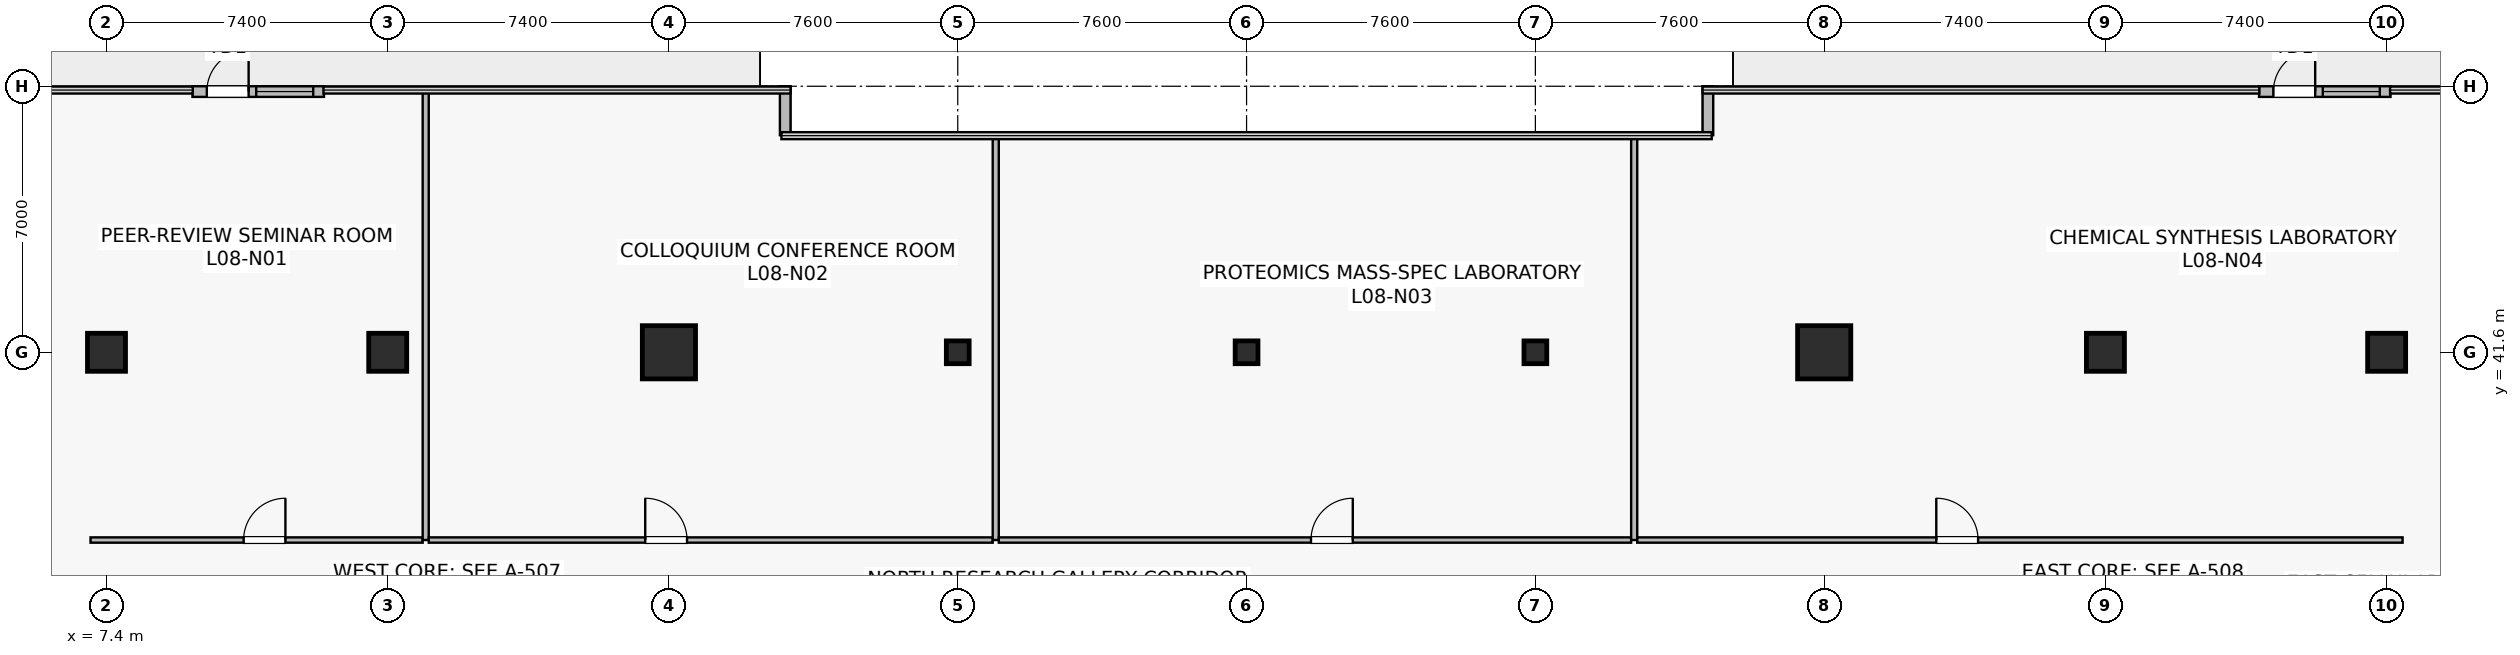
"""IFC4 building model, lengths in metres.
Left out: names, types, materials, properties, quantities, classifications, styles, units other than length and angle.
Written with IfcOpenShell. Run it as: python <this file> out.ifc"""

import sys

from ifc_helpers import new_model, si_unit, direction, frame, frame_2d, origin, origin_2d, place, context, subcontext, project, spatial, rectangle, hollow_rectangle, extrude, source, transform, mapped, element, fill, save


model = new_model("IFC4")
c1 = context("Model", 3, precision=1e-05, world=origin(), true_north=direction((0.0, 1.0)))
c2 = subcontext(c1, "Body", "Model", "MODEL_VIEW")
j1 = project(units=[si_unit("LENGTHUNIT", "METRE"), si_unit("PLANEANGLEUNIT", "RADIAN")], contexts=[c1])
p1 = place(None, origin())
s1 = spatial("IfcSite", under=j1, at=p1, CompositionType="ELEMENT")
p2 = place(p1, origin())
s2 = spatial("IfcBuilding", under=s1, at=p2, CompositionType="ELEMENT")
p3 = place(p2, frame((0.0, 0.0, 33.4)))
s3 = spatial("IfcBuildingStorey", under=s2, at=p3, CompositionType="ELEMENT", Elevation=33.4)
m1 = source(origin(), c2, "Body", "SweptSolid", [
    extrude(rectangle(XDim=1.0, YDim=1.0, at=origin_2d()), origin(), (0.0, 0.0, 1.0), 4.1),
])
p4 = place(p3, frame((14.8, 41.6, 0.0), z_axis=(0.0, 0.0, 1.0), x_axis=(1.0, 0.0, 0.0)))
e1 = element("IfcColumn", 1, at=p4, inside=s3, PredefinedType="COLUMN", context=c2, shape_type="MappedRepresentation", body=[
    mapped(m1, transform((0.0, 0.0, 0.0), scale=1.0)),
])
m2 = source(origin(), c2, "Body", "SweptSolid", [
    extrude(rectangle(XDim=1.4, YDim=1.4, at=origin_2d()), origin(), (0.0, 0.0, 1.0), 4.1),
])
for number, where, z_axis, x_axis in (
    (2, (22.2, 41.6, 0.0), (0.0, 0.0, 1.0), (1.0, 0.0, 0.0)),
    (3, (52.6, 41.6, 0.0), (0.0, 0.0, 1.0), (1.0, 0.0, 0.0)),
):
    element("IfcColumn", number, at=place(p3, frame(where, z_axis=z_axis, x_axis=x_axis)), inside=s3, PredefinedType="COLUMN", context=c2, shape_type="MappedRepresentation", body=[
        mapped(m2, transform((0.0, 0.0, 0.0), scale=1.0)),
    ])
for number, where, z_axis, x_axis in (
    (4, (60.0, 41.6, 0.0), (0.0, 0.0, 1.0), (1.0, 0.0, 0.0)),
    (5, (7.4, 41.6, 0.0), (0.0, 0.0, 1.0), (1.0, 0.0, 0.0)),
    (6, (67.4, 41.6, 0.0), (0.0, 0.0, 1.0), (1.0, 0.0, 0.0)),
):
    element("IfcColumn", number, at=place(p3, frame(where, z_axis=z_axis, x_axis=x_axis)), inside=s3, PredefinedType="COLUMN", context=c2, shape_type="MappedRepresentation", body=[
        mapped(m1, transform((0.0, 0.0, 0.0), scale=1.0)),
    ])
m3 = source(origin(), c2, "Body", "SweptSolid", [
    extrude(hollow_rectangle(XDim=0.6, YDim=0.6, WallThickness=0.028, at=origin_2d()), origin(), (0.0, 0.0, 1.0), 4.1),
])
for number, where, z_axis, x_axis in (
    (7, (29.8, 41.6, 0.0), (0.0, 0.0, 1.0), (1.0, 0.0, 0.0)),
    (8, (37.4, 41.6, 0.0), (0.0, 0.0, 1.0), (1.0, 0.0, 0.0)),
    (9, (45.0, 41.6, 0.0), (0.0, 0.0, 1.0), (1.0, 0.0, 0.0)),
):
    element("IfcColumn", number, at=place(p3, frame(where, z_axis=z_axis, x_axis=x_axis)), inside=s3, PredefinedType="COLUMN", context=c2, shape_type="MappedRepresentation", body=[
        mapped(m3, transform((0.0, 0.0, 0.0), scale=1.0)),
    ])
p5 = place(p3, frame((9.662, 48.46, 0.0), z_axis=(0.0, 0.0, 1.0), x_axis=(1.0, 0.0, 0.0)))
e10 = element("IfcWall", 10, at=p5, inside=s3, PredefinedType="STANDARD", context=c2, shape_type="SweptSolid", body=[
    extrude(rectangle(XDim=3.461, YDim=0.28, at=frame_2d((1.73, 0.0))), origin(), (0.0, 0.0, 1.0), 3.78),
])
p6 = place(p5, frame((0.378, 0.0, 0.0)))
e11 = element("IfcOpeningElement", 11, at=p6, cuts=e10, PredefinedType="OPENING", context=c2, shape_type="SweptSolid", body=[
    extrude(rectangle(XDim=1.1, YDim=2.2, at=frame_2d((0.55, 1.1))), frame((0.0, 0.15, 0.0), z_axis=(0.0, -1.0, 0.0), x_axis=(1.0, 0.0, 0.0)), (0.0, 0.0, 1.0), 0.3),
])
p7 = place(p5, frame((1.678, 0.0, 0.9)))
e12 = element("IfcOpeningElement", 12, at=p7, cuts=e10, PredefinedType="OPENING", context=c2, shape_type="SweptSolid", body=[
    extrude(rectangle(XDim=1.5, YDim=2.2, at=frame_2d((0.75, 1.1))), frame((0.0, 0.15, 0.0), z_axis=(0.0, -1.0, 0.0), x_axis=(1.0, 0.0, 0.0)), (0.0, 0.0, 1.0), 0.3),
])
p8 = place(p3, frame((64.042, 48.46, 0.0), z_axis=(0.0, 0.0, 1.0), x_axis=(1.0, 0.0, 0.0)))
e13 = element("IfcWall", 13, at=p8, inside=s3, PredefinedType="STANDARD", context=c2, shape_type="SweptSolid", body=[
    extrude(rectangle(XDim=3.461, YDim=0.28, at=frame_2d((1.73, 0.0))), origin(), (0.0, 0.0, 1.0), 3.78),
])
p9 = place(p8, frame((0.378, 0.0, 0.0)))
e14 = element("IfcOpeningElement", 14, at=p9, cuts=e13, PredefinedType="OPENING", context=c2, shape_type="SweptSolid", body=[
    extrude(rectangle(XDim=1.1, YDim=2.2, at=frame_2d((0.55, 1.1))), frame((0.0, 0.15, 0.0), z_axis=(0.0, -1.0, 0.0), x_axis=(1.0, 0.0, 0.0)), (0.0, 0.0, 1.0), 0.3),
])
p10 = place(p8, frame((1.678, 0.0, 0.9)))
e15 = element("IfcOpeningElement", 15, at=p10, cuts=e13, PredefinedType="OPENING", context=c2, shape_type="SweptSolid", body=[
    extrude(rectangle(XDim=1.5, YDim=2.2, at=frame_2d((0.75, 1.1))), frame((0.0, 0.15, 0.0), z_axis=(0.0, -1.0, 0.0), x_axis=(1.0, 0.0, 0.0)), (0.0, 0.0, 1.0), 0.3),
])
for number, where, z_axis, x_axis in (
    (16, (49.54, 48.6, 0.0), (0.0, 0.0, 1.0), (0.0, -1.0, 0.0)),
    (17, (25.26, 47.312, 0.0), (0.0, 0.0, 1.0), (0.0, 1.0, 0.0)),
):
    element("IfcWall", number, at=place(p3, frame(where, z_axis=z_axis, x_axis=x_axis)), inside=s3, PredefinedType="STANDARD", context=c2, shape_type="SweptSolid", body=[
        extrude(rectangle(XDim=1.288, YDim=0.28, at=frame_2d((0.644, 0.0))), origin(), (0.0, 0.0, 1.0), 3.78),
    ])
p11 = place(p3, frame((6.98, 36.66, 0.0), z_axis=(0.0, 0.0, 1.0), x_axis=(1.0, 0.0, 0.0)))
e18 = element("IfcWall", 18, at=p11, inside=s3, PredefinedType="PARTITIONING", context=c2, shape_type="SweptSolid", body=[
    extrude(rectangle(XDim=8.74, YDim=0.14, at=frame_2d((4.37, 0.0))), origin(), (0.0, 0.0, 1.0), 3.065),
])
p12 = place(p11, frame((4.028, 0.0, 0.0)))
e19 = element("IfcOpeningElement", 19, at=p12, cuts=e18, PredefinedType="OPENING", context=c2, shape_type="SweptSolid", body=[
    extrude(rectangle(XDim=1.1, YDim=2.18, at=frame_2d((0.55, 1.09))), frame((0.0, 0.08, 0.0), z_axis=(0.0, -1.0, 0.0), x_axis=(1.0, 0.0, 0.0)), (0.0, 0.0, 1.0), 0.16),
])
p13 = place(p3, frame((15.8, 36.66, 0.0), z_axis=(0.0, 0.0, 1.0), x_axis=(0.0, 1.0, 0.0)))
e20 = element("IfcWall", 20, at=p13, inside=s3, PredefinedType="PARTITIONING", context=c2, shape_type="SweptSolid", body=[
    extrude(rectangle(XDim=11.83, YDim=0.16, at=frame_2d((5.915, 0.0))), origin(), (0.0, 0.0, 1.0), 3.015),
])
p14 = place(p3, frame((15.88, 36.66, 0.0), z_axis=(0.0, 0.0, 1.0), x_axis=(1.0, 0.0, 0.0)))
e21 = element("IfcWall", 21, at=p14, inside=s3, PredefinedType="PARTITIONING", context=c2, shape_type="SweptSolid", body=[
    extrude(rectangle(XDim=14.84, YDim=0.14, at=frame_2d((7.42, 0.0))), origin(), (0.0, 0.0, 1.0), 3.065),
])
p15 = place(p14, frame((5.696, 0.0, 0.0)))
e22 = element("IfcOpeningElement", 22, at=p15, cuts=e21, PredefinedType="OPENING", context=c2, shape_type="SweptSolid", body=[
    extrude(rectangle(XDim=1.1, YDim=2.18, at=frame_2d((0.55, 1.09))), frame((0.0, 0.08, 0.0), z_axis=(0.0, -1.0, 0.0), x_axis=(1.0, 0.0, 0.0)), (0.0, 0.0, 1.0), 0.16),
])
p16 = place(p3, frame((30.8, 36.66, 0.0), z_axis=(0.0, 0.0, 1.0), x_axis=(0.0, 1.0, 0.0)))
e23 = element("IfcWall", 23, at=p16, inside=s3, PredefinedType="PARTITIONING", context=c2, shape_type="SweptSolid", body=[
    extrude(rectangle(XDim=10.63, YDim=0.16, at=frame_2d((5.315, 0.0))), origin(), (0.0, 0.0, 1.0), 3.015),
])
p17 = place(p3, frame((30.88, 36.66, 0.0), z_axis=(0.0, 0.0, 1.0), x_axis=(1.0, 0.0, 0.0)))
e24 = element("IfcWall", 24, at=p17, inside=s3, PredefinedType="PARTITIONING", context=c2, shape_type="SweptSolid", body=[
    extrude(rectangle(XDim=16.64, YDim=0.14, at=frame_2d((8.32, 0.0))), origin(), (0.0, 0.0, 1.0), 3.065),
])
p18 = place(p17, frame((8.215, 0.0, 0.0)))
e25 = element("IfcOpeningElement", 25, at=p18, cuts=e24, PredefinedType="OPENING", context=c2, shape_type="SweptSolid", body=[
    extrude(rectangle(XDim=1.1, YDim=2.18, at=frame_2d((0.55, 1.09))), frame((0.0, 0.08, 0.0), z_axis=(0.0, -1.0, 0.0), x_axis=(1.0, 0.0, 0.0)), (0.0, 0.0, 1.0), 0.16),
])
p19 = place(p3, frame((47.6, 36.66, 0.0), z_axis=(0.0, 0.0, 1.0), x_axis=(0.0, 1.0, 0.0)))
e26 = element("IfcWall", 26, at=p19, inside=s3, PredefinedType="PARTITIONING", context=c2, shape_type="SweptSolid", body=[
    extrude(rectangle(XDim=10.63, YDim=0.16, at=frame_2d((5.315, 0.0))), origin(), (0.0, 0.0, 1.0), 3.015),
])
p20 = place(p3, frame((47.68, 36.66, 0.0), z_axis=(0.0, 0.0, 1.0), x_axis=(1.0, 0.0, 0.0)))
e27 = element("IfcWall", 27, at=p20, inside=s3, PredefinedType="PARTITIONING", context=c2, shape_type="SweptSolid", body=[
    extrude(rectangle(XDim=20.14, YDim=0.14, at=frame_2d((10.07, 0.0))), origin(), (0.0, 0.0, 1.0), 3.065),
])
p21 = place(p20, frame((7.869, 0.0, 0.0)))
e28 = element("IfcOpeningElement", 28, at=p21, cuts=e27, PredefinedType="OPENING", context=c2, shape_type="SweptSolid", body=[
    extrude(rectangle(XDim=1.1, YDim=2.18, at=frame_2d((0.55, 1.09))), frame((0.0, 0.08, 0.0), z_axis=(0.0, -1.0, 0.0), x_axis=(1.0, 0.0, 0.0)), (0.0, 0.0, 1.0), 0.16),
])
m4 = source(origin(), c2, "Body", "SweptSolid", [
    extrude(rectangle(XDim=1.1, YDim=2.2, at=frame_2d((0.55, 1.1))), frame((0.0, 0.025, 0.0), z_axis=(0.0, -1.0, 0.0), x_axis=(1.0, 0.0, 0.0)), (0.0, 0.0, 1.0), 0.05),
])
p22 = place(p6, origin())
e29 = element("IfcDoor", 29, at=p22, inside=s3, OperationType="SINGLE_SWING_RIGHT", PredefinedType="DOOR", context=c2, shape_type="MappedRepresentation", body=[
    mapped(m4, transform((0.0, 0.0, 0.0), scale=1.0)),
])
fill(e11, e29)
m5 = source(origin(), c2, "Body", "SweptSolid", [
    extrude(rectangle(XDim=1.5, YDim=2.2, at=frame_2d((0.75, 1.1))), frame((0.0, 0.03, 0.0), z_axis=(0.0, -1.0, 0.0), x_axis=(1.0, 0.0, 0.0)), (0.0, 0.0, 1.0), 0.06),
])
p23 = place(p7, origin())
e30 = element("IfcWindow", 30, at=p23, inside=s3, PartitioningType="SINGLE_PANEL", PredefinedType="WINDOW", context=c2, shape_type="MappedRepresentation", body=[
    mapped(m5, transform((0.0, 0.0, 0.0), scale=1.0)),
])
fill(e12, e30)
p24 = place(p9, origin())
e31 = element("IfcDoor", 31, at=p24, inside=s3, OperationType="SINGLE_SWING_RIGHT", PredefinedType="DOOR", context=c2, shape_type="MappedRepresentation", body=[
    mapped(m4, transform((0.0, 0.0, 0.0), scale=1.0)),
])
fill(e14, e31)
p25 = place(p10, origin())
e32 = element("IfcWindow", 32, at=p25, inside=s3, PartitioningType="SINGLE_PANEL", PredefinedType="WINDOW", context=c2, shape_type="MappedRepresentation", body=[
    mapped(m5, transform((0.0, 0.0, 0.0), scale=1.0)),
])
fill(e15, e32)
m6 = source(origin(), c2, "Body", "SweptSolid", [
    extrude(rectangle(XDim=1.1, YDim=2.18, at=frame_2d((0.55, 1.09))), frame((0.0, 0.025, 0.0), z_axis=(0.0, -1.0, 0.0), x_axis=(1.0, 0.0, 0.0)), (0.0, 0.0, 1.0), 0.05),
])
p26 = place(p12, origin())
e33 = element("IfcDoor", 33, at=p26, inside=s3, OperationType="SINGLE_SWING_RIGHT", PredefinedType="DOOR", context=c2, shape_type="MappedRepresentation", body=[
    mapped(m6, transform((0.0, 0.0, 0.0), scale=1.0)),
])
fill(e19, e33)
p27 = place(p15, origin())
e34 = element("IfcDoor", 34, at=p27, inside=s3, OperationType="SINGLE_SWING_LEFT", PredefinedType="DOOR", context=c2, shape_type="MappedRepresentation", body=[
    mapped(m6, transform((0.0, 0.0, 0.0), scale=1.0)),
])
fill(e22, e34)
p28 = place(p18, origin())
e35 = element("IfcDoor", 35, at=p28, inside=s3, OperationType="SINGLE_SWING_RIGHT", PredefinedType="DOOR", context=c2, shape_type="MappedRepresentation", body=[
    mapped(m6, transform((0.0, 0.0, 0.0), scale=1.0)),
])
fill(e25, e35)
p29 = place(p21, origin())
e36 = element("IfcDoor", 36, at=p29, inside=s3, OperationType="SINGLE_SWING_LEFT", PredefinedType="DOOR", context=c2, shape_type="MappedRepresentation", body=[
    mapped(m6, transform((0.0, 0.0, 0.0), scale=1.0)),
])
fill(e28, e36)
save(model, sys.argv[1])
